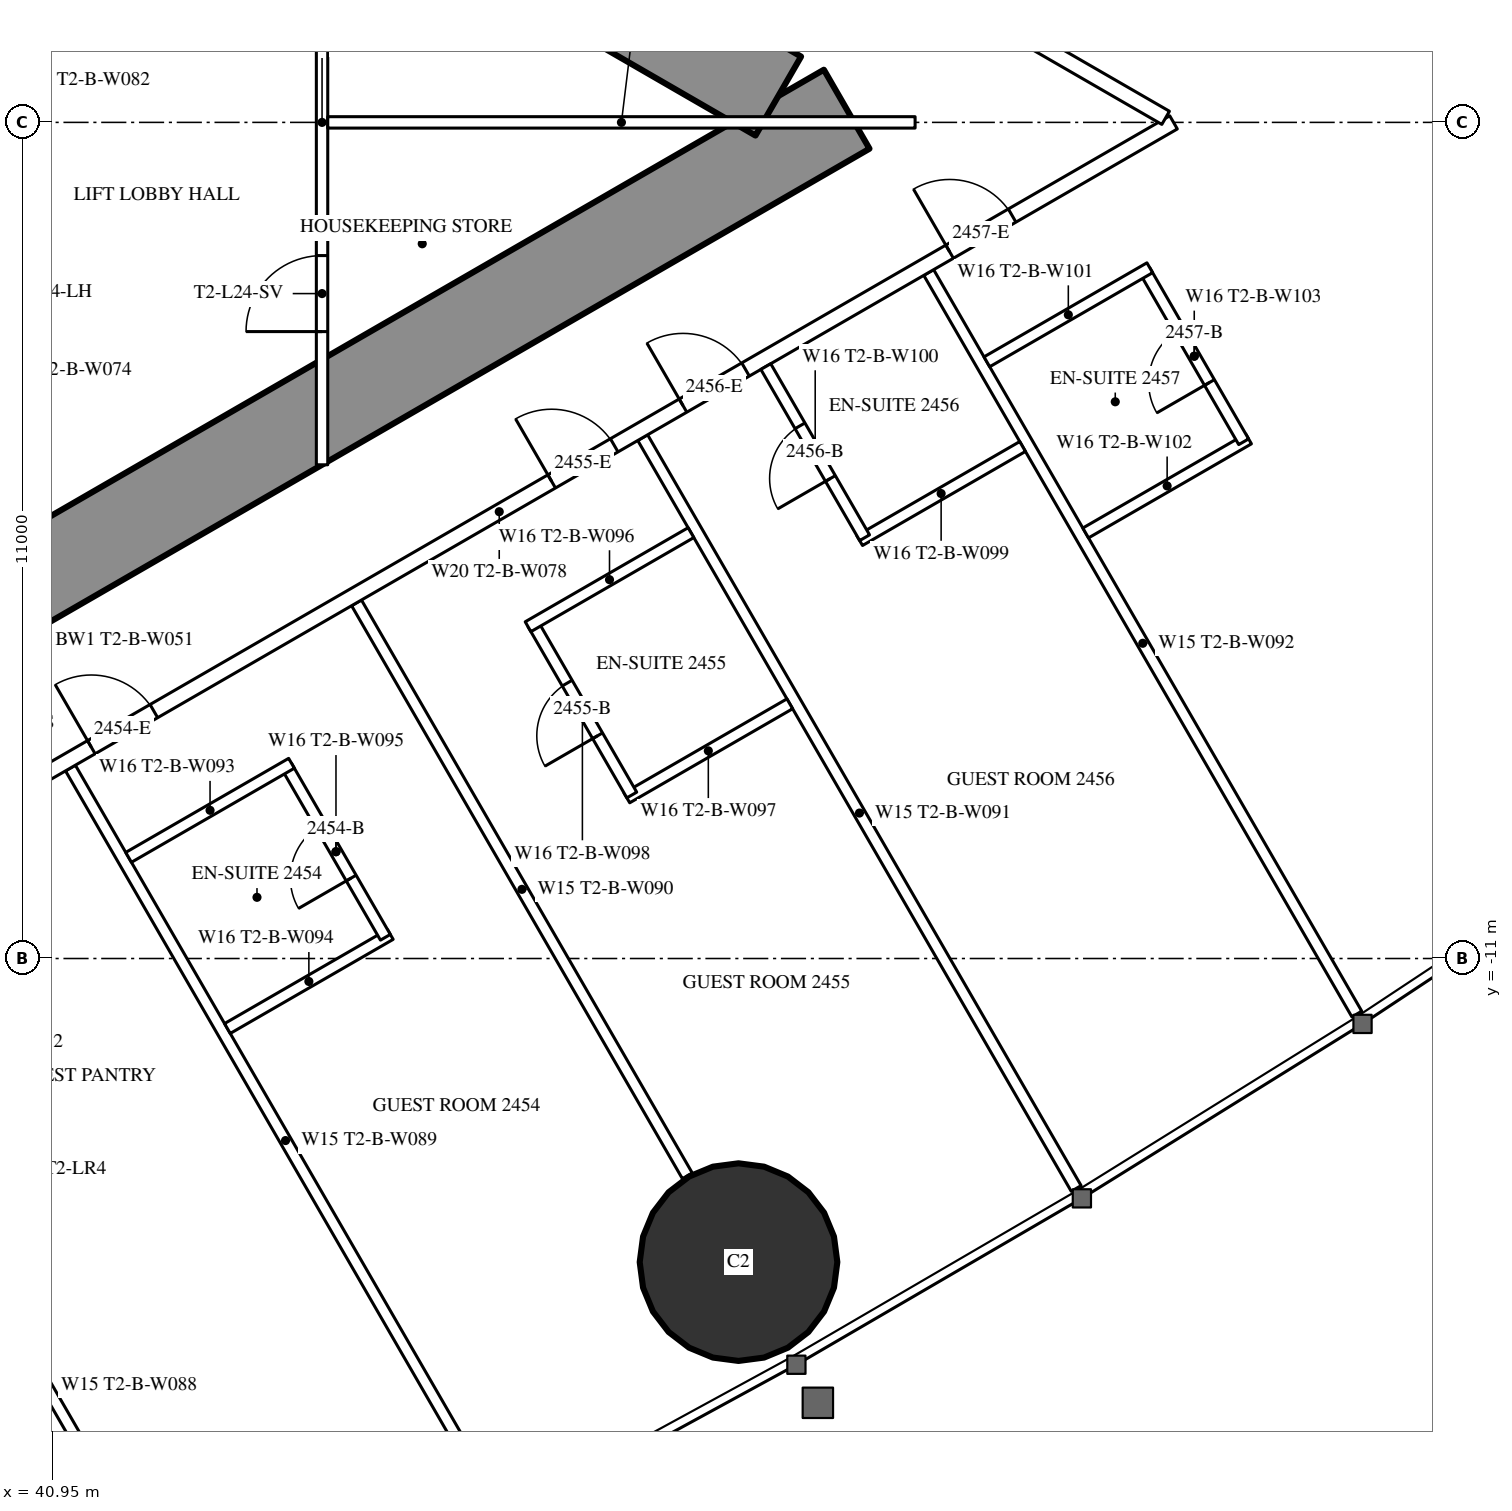
"""IFC4 building model, lengths in metres.
Left out: names, types, materials, properties, quantities, classifications, styles, units other than length and angle.
Written with IfcOpenShell. Run it as: python <this file> out.ifc"""

import sys

from ifc_helpers import new_model, si_unit, direction, frame, frame_2d, origin, origin_2d, place, context, subcontext, project, spatial, rectangle, hollow_circle, extrude, element, fill, save


model = new_model("IFC4")
c1 = context("Model", 3, precision=1e-05, world=origin(), true_north=direction((0.0, 1.0)))
c2 = subcontext(c1, "Body", "Model", "MODEL_VIEW")
j1 = project(units=[si_unit("LENGTHUNIT", "METRE"), si_unit("PLANEANGLEUNIT", "RADIAN")], contexts=[c1])
p1 = place(None, origin())
s1 = spatial("IfcSite", under=j1, at=p1, CompositionType="ELEMENT")
p2 = place(p1, origin())
s2 = spatial("IfcBuilding", under=s1, at=p2, CompositionType="ELEMENT")
p3 = place(p2, frame((0.0, 0.0, 94.1)))
s3 = spatial("IfcBuildingStorey", under=s2, at=p3, CompositionType="ELEMENT", Elevation=94.1)
p4 = place(p3, frame((49.979, -14.994, 0.0), z_axis=(0.0, 0.0, 1.0), x_axis=(1.0, 0.0, 0.0)))
e1 = element("IfcColumn", 1, at=p4, inside=s3, PredefinedType="COLUMN", context=c2, shape_type="SweptSolid", body=[
    extrude(hollow_circle(Radius=1.3, WallThickness=0.1, at=origin_2d()), origin(), (0.0, 0.0, 1.0), 3.5),
])
p5 = place(p3, frame((27.2, -13.8, 0.0), z_axis=(0.0, 0.0, 1.0), x_axis=(0.866027159892, 0.499996958321, 0.0)))
e2 = element("IfcWall", 2, at=p5, inside=s3, PredefinedType="SHEAR", context=c2, shape_type="SweptSolid", body=[
    extrude(rectangle(XDim=27.947, YDim=1.2, at=frame_2d((13.973, 0.0))), origin(), (0.0, 0.0, 1.0), 3.5),
])
p6 = place(p5, frame((4.6, 0.0, 0.0)))
e3 = element("IfcOpeningElement", 3, at=p6, cuts=e2, PredefinedType="OPENING", context=c2, shape_type="SweptSolid", body=[
    extrude(rectangle(XDim=1.0, YDim=2.2, at=frame_2d((0.5, 1.1))), frame((0.0, 0.61, 0.0), z_axis=(0.0, -1.0, 0.0), x_axis=(1.0, 0.0, 0.0)), (0.0, 0.0, 1.0), 1.22),
])
p7 = place(p5, frame((13.395, 0.0, 0.0)))
e4 = element("IfcOpeningElement", 4, at=p7, cuts=e2, PredefinedType="OPENING", context=c2, shape_type="SweptSolid", body=[
    extrude(rectangle(XDim=1.8, YDim=2.2, at=frame_2d((0.9, 1.1))), frame((0.0, 0.61, 0.0), z_axis=(0.0, -1.0, 0.0), x_axis=(1.0, 0.0, 0.0)), (0.0, 0.0, 1.0), 1.22),
])
p8 = place(p3, frame((27.2, 13.8, 0.0), z_axis=(0.0, 0.0, 1.0), x_axis=(0.866024515034, -0.500001539357, 0.0)))
e5 = element("IfcWall", 5, at=p8, inside=s3, PredefinedType="SHEAR", context=c2, shape_type="SweptSolid", body=[
    extrude(rectangle(XDim=26.907, YDim=1.2, at=frame_2d((13.454, 0.0))), origin(), (0.0, 0.0, 1.0), 3.5),
])
p9 = place(p8, frame((4.6, 0.0, 0.0)))
e6 = element("IfcOpeningElement", 6, at=p9, cuts=e5, PredefinedType="OPENING", context=c2, shape_type="SweptSolid", body=[
    extrude(rectangle(XDim=1.0, YDim=2.2, at=frame_2d((0.5, 1.1))), frame((0.0, 0.61, 0.0), z_axis=(0.0, -1.0, 0.0), x_axis=(1.0, 0.0, 0.0)), (0.0, 0.0, 1.0), 1.22),
])
p10 = place(p8, frame((13.395, 0.0, 0.0)))
e7 = element("IfcOpeningElement", 7, at=p10, cuts=e5, PredefinedType="OPENING", context=c2, shape_type="SweptSolid", body=[
    extrude(rectangle(XDim=1.8, YDim=2.2, at=frame_2d((0.9, 1.1))), frame((0.0, 0.61, 0.0), z_axis=(0.0, -1.0, 0.0), x_axis=(1.0, 0.0, 0.0)), (0.0, 0.0, 1.0), 1.22),
])
p11 = place(p3, frame((41.19, -8.494, 0.0), z_axis=(0.0, 0.0, 1.0), x_axis=(0.49999258054, -0.866029687369, 0.0)))
e8 = element("IfcWall", 8, at=p11, inside=s3, PredefinedType="PARTITIONING", context=c2, shape_type="SweptSolid", body=[
    extrude(rectangle(XDim=11.318, YDim=0.15, at=frame_2d((5.659, 0.0))), origin(), (0.0, 0.0, 1.0), 3.25),
])
p12 = place(p3, frame((44.954, -6.321, 0.0), z_axis=(0.0, 0.0, 1.0), x_axis=(0.500018676722, -0.866014620505, 0.0)))
e9 = element("IfcWall", 9, at=p12, inside=s3, PredefinedType="PARTITIONING", context=c2, shape_type="SweptSolid", body=[
    extrude(rectangle(XDim=8.704, YDim=0.15, at=frame_2d((4.352, 0.0))), origin(), (0.0, 0.0, 1.0), 2.2),
])
p13 = place(p3, frame((48.719, -4.147, 0.0), z_axis=(0.0, 0.0, 1.0), x_axis=(0.499990498062, -0.866030889661, 0.0)))
e10 = element("IfcWall", 10, at=p13, inside=s3, PredefinedType="PARTITIONING", context=c2, shape_type="SweptSolid", body=[
    extrude(rectangle(XDim=11.406, YDim=0.15, at=frame_2d((5.703, 0.0))), origin(), (0.0, 0.0, 1.0), 3.25),
])
p14 = place(p3, frame((52.481, -1.975, 0.0), z_axis=(0.0, 0.0, 1.0), x_axis=(0.500003867771, -0.866023170714, 0.0)))
e11 = element("IfcWall", 11, at=p14, inside=s3, PredefinedType="PARTITIONING", context=c2, shape_type="SweptSolid", body=[
    extrude(rectangle(XDim=11.265, YDim=0.15, at=frame_2d((5.632, 0.0))), origin(), (0.0, 0.0, 1.0), 3.25),
])
p15 = place(p3, frame((40.105, -15.299, 0.0), z_axis=(0.0, 0.0, 1.0), x_axis=(0.499978822259, -0.866037630414, 0.0)))
e12 = element("IfcWall", 12, at=p15, inside=s3, PredefinedType="PARTITIONING", context=c2, shape_type="SweptSolid", body=[
    extrude(rectangle(XDim=3.023, YDim=0.15, at=frame_2d((1.511, 0.0))), origin(), (0.0, 0.0, 1.0), 3.25),
])
p16 = place(p3, frame((37.96, -10.243, 0.0), z_axis=(0.0, 0.0, 1.0), x_axis=(0.866026429433, 0.499998223521, 0.0)))
e13 = element("IfcWall", 13, at=p16, inside=s3, PredefinedType="PARTITIONING", context=c2, shape_type="SweptSolid", body=[
    extrude(rectangle(XDim=20.487, YDim=0.2, at=frame_2d((10.243, 0.0))), origin(), (0.0, 0.0, 1.0), 3.25),
])
p17 = place(p16, frame((4.047, 0.0, 0.0)))
e14 = element("IfcOpeningElement", 14, at=p17, cuts=e13, PredefinedType="OPENING", context=c2, shape_type="SweptSolid", body=[
    extrude(rectangle(XDim=0.95, YDim=2.2, at=frame_2d((0.475, 1.1))), frame((0.0, 0.11, 0.0), z_axis=(0.0, -1.0, 0.0), x_axis=(1.0, 0.0, 0.0)), (0.0, 0.0, 1.0), 0.22),
])
p18 = place(p16, frame((11.04, 0.0, 0.0)))
e15 = element("IfcOpeningElement", 15, at=p18, cuts=e13, PredefinedType="OPENING", context=c2, shape_type="SweptSolid", body=[
    extrude(rectangle(XDim=0.95, YDim=2.2, at=frame_2d((0.475, 1.1))), frame((0.0, 0.11, 0.0), z_axis=(0.0, -1.0, 0.0), x_axis=(1.0, 0.0, 0.0)), (0.0, 0.0, 1.0), 0.22),
])
p19 = place(p16, frame((13.035, 0.0, 0.0)))
e16 = element("IfcOpeningElement", 16, at=p19, cuts=e13, PredefinedType="OPENING", context=c2, shape_type="SweptSolid", body=[
    extrude(rectangle(XDim=0.95, YDim=2.2, at=frame_2d((0.475, 1.1))), frame((0.0, 0.11, 0.0), z_axis=(0.0, -1.0, 0.0), x_axis=(1.0, 0.0, 0.0)), (0.0, 0.0, 1.0), 0.22),
])
p20 = place(p16, frame((17.085, 0.0, 0.0)))
e17 = element("IfcOpeningElement", 17, at=p20, cuts=e13, PredefinedType="OPENING", context=c2, shape_type="SweptSolid", body=[
    extrude(rectangle(XDim=0.95, YDim=2.2, at=frame_2d((0.475, 1.1))), frame((0.0, 0.11, 0.0), z_axis=(0.0, -1.0, 0.0), x_axis=(1.0, 0.0, 0.0)), (0.0, 0.0, 1.0), 0.22),
])
p21 = place(p16, frame((1.048, 0.0, 0.0)))
e18 = element("IfcOpeningElement", 18, at=p21, cuts=e13, PredefinedType="OPENING", context=c2, shape_type="SweptSolid", body=[
    extrude(rectangle(XDim=1.8, YDim=2.2, at=frame_2d((0.9, 1.1))), frame((0.0, 0.11, 0.0), z_axis=(0.0, -1.0, 0.0), x_axis=(1.0, 0.0, 0.0)), (0.0, 0.0, 1.0), 0.22),
])
p22 = place(p3, frame((36.834, 10.894, 0.0), z_axis=(0.0, 0.0, 1.0), x_axis=(0.866028157229, -0.499995230863, 0.0)))
e19 = element("IfcWall", 19, at=p22, inside=s3, PredefinedType="PARTITIONING", context=c2, shape_type="SweptSolid", body=[
    extrude(rectangle(XDim=21.667, YDim=0.2, at=frame_2d((10.833, 0.0))), origin(), (0.0, 0.0, 1.0), 3.25),
])
p23 = place(p22, frame((14.04, 0.0, 0.0)))
e20 = element("IfcOpeningElement", 20, at=p23, cuts=e19, PredefinedType="OPENING", context=c2, shape_type="SweptSolid", body=[
    extrude(rectangle(XDim=0.95, YDim=2.2, at=frame_2d((0.475, 1.1))), frame((0.0, 0.11, 0.0), z_axis=(0.0, -1.0, 0.0), x_axis=(1.0, 0.0, 0.0)), (0.0, 0.0, 1.0), 0.22),
])
p24 = place(p22, frame((9.99, 0.0, 0.0)))
e21 = element("IfcOpeningElement", 21, at=p24, cuts=e19, PredefinedType="OPENING", context=c2, shape_type="SweptSolid", body=[
    extrude(rectangle(XDim=0.95, YDim=2.2, at=frame_2d((0.475, 1.1))), frame((0.0, 0.11, 0.0), z_axis=(0.0, -1.0, 0.0), x_axis=(1.0, 0.0, 0.0)), (0.0, 0.0, 1.0), 0.22),
])
p25 = place(p22, frame((3.35, 0.0, 0.0)))
e22 = element("IfcOpeningElement", 22, at=p25, cuts=e19, PredefinedType="OPENING", context=c2, shape_type="SweptSolid", body=[
    extrude(rectangle(XDim=1.0, YDim=2.2, at=frame_2d((0.5, 1.1))), frame((0.0, 0.11, 0.0), z_axis=(0.0, -1.0, 0.0), x_axis=(1.0, 0.0, 0.0)), (0.0, 0.0, 1.0), 0.22),
])
p26 = place(p3, frame((43.255, -11.921, 0.0), z_axis=(0.0, 0.0, 1.0), x_axis=(0.866006523861, 0.500032699561, 0.0)))
e23 = element("IfcWall", 23, at=p26, inside=s3, PredefinedType="PARTITIONING", context=c2, shape_type="SweptSolid", body=[
    extrude(rectangle(XDim=2.475, YDim=0.15, at=frame_2d((1.237, 0.0))), origin(), (0.0, 0.0, 1.0), 3.25),
])
p27 = place(p3, frame((44.033, -8.469, 0.0), z_axis=(0.0, 0.0, 1.0), x_axis=(0.500047596559, -0.865997922154, 0.0)))
e24 = element("IfcWall", 24, at=p27, inside=s3, PredefinedType="PARTITIONING", context=c2, shape_type="SweptSolid", body=[
    extrude(rectangle(XDim=2.6, YDim=0.15, at=frame_2d((1.3, 0.0))), origin(), (0.0, 0.0, 1.0), 3.25),
])
p28 = place(p27, frame((0.9, 0.0, 0.0)))
e25 = element("IfcOpeningElement", 25, at=p28, cuts=e24, PredefinedType="OPENING", context=c2, shape_type="SweptSolid", body=[
    extrude(rectangle(XDim=0.8, YDim=2.2, at=frame_2d((0.4, 1.1))), frame((0.0, 0.085, 0.0), z_axis=(0.0, -1.0, 0.0), x_axis=(1.0, 0.0, 0.0)), (0.0, 0.0, 1.0), 0.17),
])
p29 = place(p3, frame((41.955, -9.669, 0.0), z_axis=(0.0, 0.0, 1.0), x_axis=(0.866006523861, 0.500032699561, 0.0)))
e26 = element("IfcWall", 26, at=p29, inside=s3, PredefinedType="PARTITIONING", context=c2, shape_type="SweptSolid", body=[
    extrude(rectangle(XDim=2.475, YDim=0.15, at=frame_2d((1.237, 0.0))), origin(), (0.0, 0.0, 1.0), 3.25),
])
p30 = place(p3, frame((48.51, -8.887, 0.0), z_axis=(0.0, 0.0, 1.0), x_axis=(0.866031185235, 0.4999899861, 0.0)))
e27 = element("IfcWall", 27, at=p30, inside=s3, PredefinedType="PARTITIONING", context=c2, shape_type="SweptSolid", body=[
    extrude(rectangle(XDim=2.475, YDim=0.15, at=frame_2d((1.238, 0.0))), origin(), (0.0, 0.0, 1.0), 3.25),
])
p31 = place(p3, frame((47.275, -6.597, 0.0), z_axis=(0.0, 0.0, 1.0), x_axis=(0.499936506574, -0.866062058628, 0.0)))
e28 = element("IfcWall", 28, at=p31, inside=s3, PredefinedType="PARTITIONING", context=c2, shape_type="SweptSolid", body=[
    extrude(rectangle(XDim=2.6, YDim=0.15, at=frame_2d((1.3, 0.0))), origin(), (0.0, 0.0, 1.0), 3.25),
])
p32 = place(p31, frame((0.9, 0.0, 0.0)))
e29 = element("IfcOpeningElement", 29, at=p32, cuts=e28, PredefinedType="OPENING", context=c2, shape_type="SweptSolid", body=[
    extrude(rectangle(XDim=0.8, YDim=2.2, at=frame_2d((0.4, 1.1))), frame((0.0, 0.085, 0.0), z_axis=(0.0, -1.0, 0.0), x_axis=(1.0, 0.0, 0.0)), (0.0, 0.0, 1.0), 0.17),
])
for number, where, z_axis, x_axis in (
    (30, (47.21, -6.635, 0.0), (0.0, 0.0, 1.0), (0.866, 0.5, 0.0)),
    (31, (51.573, -5.502, 0.0), (0.0, 0.0, 1.0), (0.866, 0.5, 0.0)),
):
    element("IfcWall", number, at=place(p3, frame(where, z_axis=z_axis, x_axis=x_axis)), inside=s3, PredefinedType="PARTITIONING", context=c2, shape_type="SweptSolid", body=[
        extrude(rectangle(XDim=2.475, YDim=0.15, at=frame_2d((1.237, 0.0))), origin(), (0.0, 0.0, 1.0), 3.25),
    ])
p33 = place(p3, frame((50.338, -3.213, 0.0), z_axis=(0.0, 0.0, 1.0), x_axis=(0.500047596559, -0.865997922154, 0.0)))
e32 = element("IfcWall", 32, at=p33, inside=s3, PredefinedType="PARTITIONING", context=c2, shape_type="SweptSolid", body=[
    extrude(rectangle(XDim=2.6, YDim=0.15, at=frame_2d((1.3, 0.0))), origin(), (0.0, 0.0, 1.0), 3.25),
])
p34 = place(p33, frame((0.9, 0.0, 0.0)))
e33 = element("IfcOpeningElement", 33, at=p34, cuts=e32, PredefinedType="OPENING", context=c2, shape_type="SweptSolid", body=[
    extrude(rectangle(XDim=0.8, YDim=2.2, at=frame_2d((0.4, 1.1))), frame((0.0, 0.085, 0.0), z_axis=(0.0, -1.0, 0.0), x_axis=(1.0, 0.0, 0.0)), (0.0, 0.0, 1.0), 0.17),
])
p35 = place(p3, frame((54.546, -5.402, 0.0), z_axis=(0.0, 0.0, 1.0), x_axis=(0.866006523861, 0.500032699561, 0.0)))
e34 = element("IfcWall", 34, at=p35, inside=s3, PredefinedType="PARTITIONING", context=c2, shape_type="SweptSolid", body=[
    extrude(rectangle(XDim=2.475, YDim=0.15, at=frame_2d((1.237, 0.0))), origin(), (0.0, 0.0, 1.0), 3.25),
])
p36 = place(p3, frame((55.325, -1.95, 0.0), z_axis=(0.0, 0.0, 1.0), x_axis=(0.500006934395, -0.866021400173, 0.0)))
e35 = element("IfcWall", 35, at=p36, inside=s3, PredefinedType="PARTITIONING", context=c2, shape_type="SweptSolid", body=[
    extrude(rectangle(XDim=2.6, YDim=0.15, at=frame_2d((1.3, 0.0))), origin(), (0.0, 0.0, 1.0), 3.25),
])
p37 = place(p36, frame((0.9, 0.0, 0.0)))
e36 = element("IfcOpeningElement", 36, at=p37, cuts=e35, PredefinedType="OPENING", context=c2, shape_type="SweptSolid", body=[
    extrude(rectangle(XDim=0.8, YDim=2.2, at=frame_2d((0.4, 1.1))), frame((0.0, 0.085, 0.0), z_axis=(0.0, -1.0, 0.0), x_axis=(1.0, 0.0, 0.0)), (0.0, 0.0, 1.0), 0.17),
])
p38 = place(p3, frame((53.246, -3.15, 0.0), z_axis=(0.0, 0.0, 1.0), x_axis=(0.866006523861, 0.500032699561, 0.0)))
e37 = element("IfcWall", 37, at=p38, inside=s3, PredefinedType="PARTITIONING", context=c2, shape_type="SweptSolid", body=[
    extrude(rectangle(XDim=2.475, YDim=0.15, at=frame_2d((1.237, 0.0))), origin(), (0.0, 0.0, 1.0), 3.25),
])
p39 = place(p3, frame((44.5, -4.505, 0.0), z_axis=(0.0, 0.0, 1.0), x_axis=(0.0, 1.0, 0.0)))
e38 = element("IfcWall", 38, at=p39, inside=s3, PredefinedType="PARTITIONING", context=c2, shape_type="SweptSolid", body=[
    extrude(rectangle(XDim=9.009, YDim=0.15, at=frame_2d((4.505, 0.0))), origin(), (0.0, 0.0, 1.0), 2.45),
])
p40 = place(p39, frame((1.752, 0.0, 0.0)))
e39 = element("IfcOpeningElement", 39, at=p40, cuts=e38, PredefinedType="OPENING", context=c2, shape_type="SweptSolid", body=[
    extrude(rectangle(XDim=1.0, YDim=2.2, at=frame_2d((0.5, 1.1))), frame((0.0, 0.085, 0.0), z_axis=(0.0, -1.0, 0.0), x_axis=(1.0, 0.0, 0.0)), (0.0, 0.0, 1.0), 0.17),
])
p41 = place(p39, frame((6.257, 0.0, 0.0)))
e40 = element("IfcOpeningElement", 40, at=p41, cuts=e38, PredefinedType="OPENING", context=c2, shape_type="SweptSolid", body=[
    extrude(rectangle(XDim=1.0, YDim=2.2, at=frame_2d((0.5, 1.1))), frame((0.0, 0.085, 0.0), z_axis=(0.0, -1.0, 0.0), x_axis=(1.0, 0.0, 0.0)), (0.0, 0.0, 1.0), 0.17),
])
p42 = place(p3, frame((44.575, 0.0, 0.0), z_axis=(0.0, 0.0, 1.0), x_axis=(1.0, 0.0, 0.0)))
e41 = element("IfcWall", 41, at=p42, inside=s3, PredefinedType="PARTITIONING", context=c2, shape_type="SweptSolid", body=[
    extrude(rectangle(XDim=7.727, YDim=0.15, at=frame_2d((3.864, 0.0))), origin(), (0.0, 0.0, 1.0), 2.2),
])
p43 = place(p28, origin())
e42 = element("IfcDoor", 42, at=p43, inside=s3, OperationType="SINGLE_SWING_RIGHT", PredefinedType="DOOR", context=c2, shape_type="SweptSolid", body=[
    extrude(rectangle(XDim=0.8, YDim=2.2, at=frame_2d((0.4, 1.1))), frame((0.0, 0.025, 0.0), z_axis=(0.0, -1.0, 0.0), x_axis=(1.0, 0.0, 0.0)), (0.0, 0.0, 1.0), 0.05),
])
fill(e25, e42)
p44 = place(p17, origin())
e43 = element("IfcDoor", 43, at=p44, inside=s3, OperationType="SINGLE_SWING_LEFT", PredefinedType="DOOR", context=c2, shape_type="SweptSolid", body=[
    extrude(rectangle(XDim=0.95, YDim=2.2, at=frame_2d((0.475, 1.1))), frame((0.0, 0.025, 0.0), z_axis=(0.0, -1.0, 0.0), x_axis=(1.0, 0.0, 0.0)), (0.0, 0.0, 1.0), 0.05),
])
fill(e14, e43)
p45 = place(p32, origin())
e44 = element("IfcDoor", 44, at=p45, inside=s3, OperationType="SINGLE_SWING_RIGHT", PredefinedType="DOOR", context=c2, shape_type="SweptSolid", body=[
    extrude(rectangle(XDim=0.8, YDim=2.2, at=frame_2d((0.4, 1.1))), frame((0.0, 0.025, 0.0), z_axis=(0.0, -1.0, 0.0), x_axis=(1.0, 0.0, 0.0)), (0.0, 0.0, 1.0), 0.05),
])
fill(e29, e44)
p46 = place(p18, origin())
e45 = element("IfcDoor", 45, at=p46, inside=s3, OperationType="SINGLE_SWING_LEFT", PredefinedType="DOOR", context=c2, shape_type="SweptSolid", body=[
    extrude(rectangle(XDim=0.95, YDim=2.2, at=frame_2d((0.475, 1.1))), frame((0.0, 0.025, 0.0), z_axis=(0.0, -1.0, 0.0), x_axis=(1.0, 0.0, 0.0)), (0.0, 0.0, 1.0), 0.05),
])
fill(e15, e45)
p47 = place(p34, origin())
e46 = element("IfcDoor", 46, at=p47, inside=s3, OperationType="SINGLE_SWING_RIGHT", PredefinedType="DOOR", context=c2, shape_type="SweptSolid", body=[
    extrude(rectangle(XDim=0.8, YDim=2.2, at=frame_2d((0.4, 1.1))), frame((0.0, 0.025, 0.0), z_axis=(0.0, -1.0, 0.0), x_axis=(1.0, 0.0, 0.0)), (0.0, 0.0, 1.0), 0.05),
])
fill(e33, e46)
p48 = place(p19, origin())
e47 = element("IfcDoor", 47, at=p48, inside=s3, OperationType="SINGLE_SWING_LEFT", PredefinedType="DOOR", context=c2, shape_type="SweptSolid", body=[
    extrude(rectangle(XDim=0.95, YDim=2.2, at=frame_2d((0.475, 1.1))), frame((0.0, 0.025, 0.0), z_axis=(0.0, -1.0, 0.0), x_axis=(1.0, 0.0, 0.0)), (0.0, 0.0, 1.0), 0.05),
])
fill(e16, e47)
p49 = place(p37, origin())
e48 = element("IfcDoor", 48, at=p49, inside=s3, OperationType="SINGLE_SWING_RIGHT", PredefinedType="DOOR", context=c2, shape_type="SweptSolid", body=[
    extrude(rectangle(XDim=0.8, YDim=2.2, at=frame_2d((0.4, 1.1))), frame((0.0, 0.025, 0.0), z_axis=(0.0, -1.0, 0.0), x_axis=(1.0, 0.0, 0.0)), (0.0, 0.0, 1.0), 0.05),
])
fill(e36, e48)
p50 = place(p20, origin())
e49 = element("IfcDoor", 49, at=p50, inside=s3, OperationType="SINGLE_SWING_LEFT", PredefinedType="DOOR", context=c2, shape_type="SweptSolid", body=[
    extrude(rectangle(XDim=0.95, YDim=2.2, at=frame_2d((0.475, 1.1))), frame((0.0, 0.025, 0.0), z_axis=(0.0, -1.0, 0.0), x_axis=(1.0, 0.0, 0.0)), (0.0, 0.0, 1.0), 0.05),
])
fill(e17, e49)
p51 = place(p40, origin())
e50 = element("IfcDoor", 50, at=p51, inside=s3, OperationType="SINGLE_SWING_LEFT", PredefinedType="DOOR", context=c2, shape_type="SweptSolid", body=[
    extrude(rectangle(XDim=1.0, YDim=2.2, at=frame_2d((0.5, 1.1))), frame((0.0, 0.025, 0.0), z_axis=(0.0, -1.0, 0.0), x_axis=(1.0, 0.0, 0.0)), (0.0, 0.0, 1.0), 0.05),
])
fill(e39, e50)
save(model, sys.argv[1])
